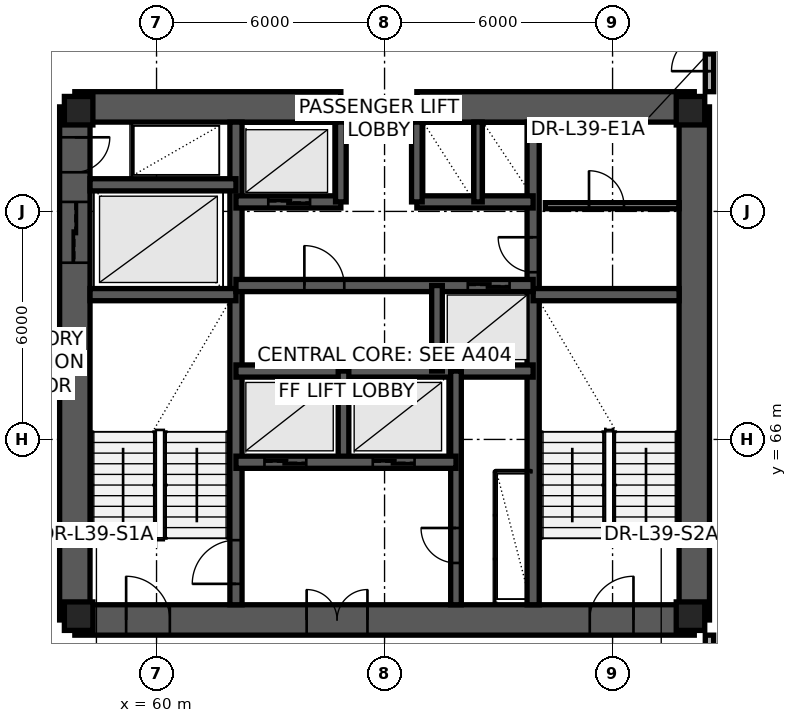
"""IFC4 building model, lengths in metres.
Left out: names, types, materials, properties, quantities, classifications, styles, units other than length and angle.
Written with IfcOpenShell. Run it as: python <this file> out.ifc"""

import sys

from ifc_helpers import new_model, si_unit, direction, frame, frame_2d, origin, origin_2d, place, context, subcontext, project, spatial, rectangle, extrude, element, fill, save


model = new_model("IFC4")
c1 = context("Model", 3, precision=1e-05, world=origin(), true_north=direction((0.0, 1.0)))
c2 = subcontext(c1, "Body", "Model", "MODEL_VIEW")
j1 = project(units=[si_unit("LENGTHUNIT", "METRE"), si_unit("PLANEANGLEUNIT", "RADIAN")], contexts=[c1])
p1 = place(None, origin())
s1 = spatial("IfcSite", under=j1, at=p1, CompositionType="ELEMENT")
p2 = place(p1, origin())
s2 = spatial("IfcBuilding", under=s1, at=p2, CompositionType="ELEMENT")
p3 = place(p2, frame((0.0, 0.0, 149.1)))
s3 = spatial("IfcBuildingStorey", under=s2, at=p3, CompositionType="ELEMENT", Elevation=149.1)
p4 = place(p3, frame((57.85, 61.25, 0.0), z_axis=(0.0, 0.0, 1.0), x_axis=(1.0, 0.0, 0.0)))
e1 = element("IfcWall", 1, at=p4, inside=s3, PredefinedType="SHEAR", context=c2, shape_type="SweptSolid", body=[
    extrude(rectangle(XDim=16.3, YDim=0.8, at=frame_2d((8.15, 0.0))), origin(), (0.0, 0.0, 1.0), 3.65),
])
p5 = place(p4, frame((1.35, 0.0, 0.0)))
e2 = element("IfcOpeningElement", 2, at=p5, cuts=e1, PredefinedType="OPENING", context=c2, shape_type="SweptSolid", body=[
    extrude(rectangle(XDim=1.15, YDim=2.15, at=frame_2d((0.575, 1.075))), frame((0.0, 0.41, 0.0), z_axis=(0.0, -1.0, 0.0), x_axis=(1.0, 0.0, 0.0)), (0.0, 0.0, 1.0), 0.82),
])
p6 = place(p4, frame((6.1, 0.0, 0.0)))
e3 = element("IfcOpeningElement", 3, at=p6, cuts=e1, PredefinedType="OPENING", context=c2, shape_type="SweptSolid", body=[
    extrude(rectangle(XDim=1.6, YDim=2.15, at=frame_2d((0.8, 1.075))), frame((0.0, 0.41, 0.0), z_axis=(0.0, -1.0, 0.0), x_axis=(1.0, 0.0, 0.0)), (0.0, 0.0, 1.0), 0.82),
])
p7 = place(p4, frame((13.55, 0.0, 0.0)))
e4 = element("IfcOpeningElement", 4, at=p7, cuts=e1, PredefinedType="OPENING", context=c2, shape_type="SweptSolid", body=[
    extrude(rectangle(XDim=1.15, YDim=2.15, at=frame_2d((0.575, 1.075))), frame((0.0, 0.41, 0.0), z_axis=(0.0, -1.0, 0.0), x_axis=(1.0, 0.0, 0.0)), (0.0, 0.0, 1.0), 0.82),
])
p8 = place(p3, frame((74.15, 61.25, 0.0), z_axis=(0.0, 0.0, 1.0), x_axis=(0.0, 1.0, 0.0)))
e5 = element("IfcWall", 5, at=p8, inside=s3, PredefinedType="SHEAR", context=c2, shape_type="SweptSolid", body=[
    extrude(rectangle(XDim=13.5, YDim=0.8, at=frame_2d((6.75, 0.0))), origin(), (0.0, 0.0, 1.0), 3.65),
])
p9 = place(p3, frame((74.15, 74.75, 0.0), z_axis=(0.0, 0.0, 1.0), x_axis=(-1.0, 0.0, 0.0)))
e6 = element("IfcWall", 6, at=p9, inside=s3, PredefinedType="SHEAR", context=c2, shape_type="SweptSolid", body=[
    extrude(rectangle(XDim=7.3, YDim=0.8, at=frame_2d((3.65, 0.0))), origin(), (0.0, 0.0, 1.0), 3.65),
])
p10 = place(p3, frame((64.85, 74.75, 0.0), z_axis=(0.0, 0.0, 1.0), x_axis=(-1.0, 0.0, 0.0)))
e7 = element("IfcWall", 7, at=p10, inside=s3, PredefinedType="SHEAR", context=c2, shape_type="SweptSolid", body=[
    extrude(rectangle(XDim=7.0, YDim=0.8, at=frame_2d((3.5, 0.0))), origin(), (0.0, 0.0, 1.0), 3.65),
])
p11 = place(p3, frame((57.85, 74.75, 0.0), z_axis=(0.0, 0.0, 1.0), x_axis=(0.0, -1.0, 0.0)))
e8 = element("IfcWall", 8, at=p11, inside=s3, PredefinedType="SHEAR", context=c2, shape_type="SweptSolid", body=[
    extrude(rectangle(XDim=13.5, YDim=0.8, at=frame_2d((6.75, 0.0))), origin(), (0.0, 0.0, 1.0), 3.65),
])
p12 = place(p11, frame((0.8, 0.0, 0.0)))
e9 = element("IfcOpeningElement", 9, at=p12, cuts=e8, PredefinedType="OPENING", context=c2, shape_type="SweptSolid", body=[
    extrude(rectangle(XDim=0.92, YDim=2.05, at=frame_2d((0.46, 1.025))), frame((0.0, 0.41, 0.0), z_axis=(0.0, -1.0, 0.0), x_axis=(1.0, 0.0, 0.0)), (0.0, 0.0, 1.0), 0.82),
])
p13 = place(p11, frame((2.5, 0.0, 0.0)))
e10 = element("IfcOpeningElement", 10, at=p13, cuts=e8, PredefinedType="OPENING", context=c2, shape_type="SweptSolid", body=[
    extrude(rectangle(XDim=1.6, YDim=2.3, at=frame_2d((0.8, 1.15))), frame((0.0, 0.41, 0.0), z_axis=(0.0, -1.0, 0.0), x_axis=(1.0, 0.0, 0.0)), (0.0, 0.0, 1.0), 0.82),
])
p14 = place(p3, frame((62.09, 61.65, 0.0), z_axis=(0.0, 0.0, 1.0), x_axis=(0.0, 1.0, 0.0)))
e11 = element("IfcWall", 11, at=p14, inside=s3, PredefinedType="SHEAR", context=c2, shape_type="SweptSolid", body=[
    extrude(rectangle(XDim=12.7, YDim=0.32, at=frame_2d((6.35, 0.0))), origin(), (0.0, 0.0, 1.0), 3.65),
])
p15 = place(p14, frame((0.55, 0.0, 0.0)))
e12 = element("IfcOpeningElement", 12, at=p15, cuts=e11, PredefinedType="OPENING", context=c2, shape_type="SweptSolid", body=[
    extrude(rectangle(XDim=1.15, YDim=2.15, at=frame_2d((0.575, 1.075))), frame((0.0, 0.17, 0.0), z_axis=(0.0, -1.0, 0.0), x_axis=(1.0, 0.0, 0.0)), (0.0, 0.0, 1.0), 0.34),
])
p16 = place(p3, frame((69.91, 61.65, 0.0), z_axis=(0.0, 0.0, 1.0), x_axis=(0.0, 1.0, 0.0)))
e13 = element("IfcWall", 13, at=p16, inside=s3, PredefinedType="SHEAR", context=c2, shape_type="SweptSolid", body=[
    extrude(rectangle(XDim=12.7, YDim=0.32, at=frame_2d((6.35, 0.0))), origin(), (0.0, 0.0, 1.0), 3.65),
])
p17 = place(p16, frame((8.75, 0.0, 0.0)))
e14 = element("IfcOpeningElement", 14, at=p17, cuts=e13, PredefinedType="OPENING", context=c2, shape_type="SweptSolid", body=[
    extrude(rectangle(XDim=0.92, YDim=2.05, at=frame_2d((0.46, 1.025))), frame((0.0, 0.17, 0.0), z_axis=(0.0, -1.0, 0.0), x_axis=(1.0, 0.0, 0.0)), (0.0, 0.0, 1.0), 0.34),
])
for number, where, z_axis, x_axis in (
    (15, (58.25, 69.81, 0.0), (0.0, 0.0, 1.0), (1.0, 0.0, 0.0)),
    (16, (69.91, 69.81, 0.0), (0.0, 0.0, 1.0), (1.0, 0.0, 0.0)),
    (17, (58.25, 72.7, 0.0), (0.0, 0.0, 1.0), (1.0, 0.0, 0.0)),
):
    element("IfcWall", number, at=place(p3, frame(where, z_axis=z_axis, x_axis=x_axis)), inside=s3, PredefinedType="SHEAR", context=c2, shape_type="SweptSolid", body=[
        extrude(rectangle(XDim=3.84, YDim=0.32, at=frame_2d((1.92, 0.0))), origin(), (0.0, 0.0, 1.0), 3.65),
    ])
p18 = place(p3, frame((62.09, 67.8, 0.0), z_axis=(0.0, 0.0, 1.0), x_axis=(1.0, 0.0, 0.0)))
e18 = element("IfcWall", 18, at=p18, inside=s3, PredefinedType="SHEAR", context=c2, shape_type="SweptSolid", body=[
    extrude(rectangle(XDim=7.82, YDim=0.32, at=frame_2d((3.91, 0.0))), origin(), (0.0, 0.0, 1.0), 3.65),
])
p19 = place(p3, frame((64.92, 65.4, 0.0), z_axis=(0.0, 0.0, 1.0), x_axis=(0.0, 1.0, 0.0)))
e19 = element("IfcWall", 19, at=p19, inside=s3, PredefinedType="SHEAR", context=c2, shape_type="SweptSolid", body=[
    extrude(rectangle(XDim=2.4, YDim=0.28, at=frame_2d((1.2, 0.0))), origin(), (0.0, 0.0, 1.0), 3.65),
])
p20 = place(p3, frame((62.09, 70.05, 0.0), z_axis=(0.0, 0.0, 1.0), x_axis=(1.0, 0.0, 0.0)))
e20 = element("IfcWall", 20, at=p20, inside=s3, PredefinedType="SHEAR", context=c2, shape_type="SweptSolid", body=[
    extrude(rectangle(XDim=7.82, YDim=0.32, at=frame_2d((3.91, 0.0))), origin(), (0.0, 0.0, 1.0), 3.65),
])
p21 = place(p20, frame((1.8, 0.0, 0.0)))
e21 = element("IfcOpeningElement", 21, at=p21, cuts=e20, PredefinedType="OPENING", context=c2, shape_type="SweptSolid", body=[
    extrude(rectangle(XDim=1.05, YDim=2.15, at=frame_2d((0.525, 1.075))), frame((0.0, 0.17, 0.0), z_axis=(0.0, -1.0, 0.0), x_axis=(1.0, 0.0, 0.0)), (0.0, 0.0, 1.0), 0.34),
])
p22 = place(p20, frame((6.1, 0.0, 0.0)))
e22 = element("IfcOpeningElement", 22, at=p22, cuts=e20, PredefinedType="OPENING", context=c2, shape_type="SweptSolid", body=[
    extrude(rectangle(XDim=1.1, YDim=2.2, at=frame_2d((0.55, 1.1))), frame((0.0, 0.17, 0.0), z_axis=(0.0, -1.0, 0.0), x_axis=(1.0, 0.0, 0.0)), (0.0, 0.0, 1.0), 0.34),
])
p23 = place(p3, frame((62.09, 72.25, 0.0), z_axis=(0.0, 0.0, 1.0), x_axis=(1.0, 0.0, 0.0)))
e23 = element("IfcWall", 23, at=p23, inside=s3, PredefinedType="SHEAR", context=c2, shape_type="SweptSolid", body=[
    extrude(rectangle(XDim=2.76, YDim=0.32, at=frame_2d((1.38, 0.0))), origin(), (0.0, 0.0, 1.0), 3.65),
])
p24 = place(p23, frame((0.85, 0.0, 0.0)))
e24 = element("IfcOpeningElement", 24, at=p24, cuts=e23, PredefinedType="OPENING", context=c2, shape_type="SweptSolid", body=[
    extrude(rectangle(XDim=1.1, YDim=2.2, at=frame_2d((0.55, 1.1))), frame((0.0, 0.17, 0.0), z_axis=(0.0, -1.0, 0.0), x_axis=(1.0, 0.0, 0.0)), (0.0, 0.0, 1.0), 0.34),
])
p25 = place(p3, frame((66.85, 72.25, 0.0), z_axis=(0.0, 0.0, 1.0), x_axis=(1.0, 0.0, 0.0)))
e25 = element("IfcWall", 25, at=p25, inside=s3, PredefinedType="SHEAR", context=c2, shape_type="SweptSolid", body=[
    extrude(rectangle(XDim=3.06, YDim=0.32, at=frame_2d((1.53, 0.0))), origin(), (0.0, 0.0, 1.0), 3.65),
])
for number, where, z_axis, x_axis in (
    (26, (64.85, 72.25, 0.0), (0.0, 0.0, 1.0), (0.0, 1.0, 0.0)),
    (27, (66.85, 72.25, 0.0), (0.0, 0.0, 1.0), (0.0, 1.0, 0.0)),
):
    element("IfcWall", number, at=place(p3, frame(where, z_axis=z_axis, x_axis=x_axis)), inside=s3, PredefinedType="SHEAR", context=c2, shape_type="SweptSolid", body=[
        extrude(rectangle(XDim=2.1, YDim=0.28, at=frame_2d((1.05, 0.0))), origin(), (0.0, 0.0, 1.0), 3.65),
    ])
p26 = place(p3, frame((68.46, 72.25, 0.0), z_axis=(0.0, 0.0, 1.0), x_axis=(0.0, 1.0, 0.0)))
e28 = element("IfcWall", 28, at=p26, inside=s3, PredefinedType="SHEAR", context=c2, shape_type="SweptSolid", body=[
    extrude(rectangle(XDim=2.1, YDim=0.22, at=frame_2d((1.05, 0.0))), origin(), (0.0, 0.0, 1.0), 3.65),
])
p27 = place(p3, frame((67.88, 61.65, 0.0), z_axis=(0.0, 0.0, 1.0), x_axis=(0.0, 1.0, 0.0)))
e29 = element("IfcWall", 29, at=p27, inside=s3, PredefinedType="SHEAR", context=c2, shape_type="SweptSolid", body=[
    extrude(rectangle(XDim=6.15, YDim=0.28, at=frame_2d((3.075, 0.0))), origin(), (0.0, 0.0, 1.0), 3.65),
])
p28 = place(p27, frame((1.1, 0.0, 0.0)))
e30 = element("IfcOpeningElement", 30, at=p28, cuts=e29, PredefinedType="OPENING", context=c2, shape_type="SweptSolid", body=[
    extrude(rectangle(XDim=0.92, YDim=2.05, at=frame_2d((0.46, 1.025))), frame((0.0, 0.15, 0.0), z_axis=(0.0, -1.0, 0.0), x_axis=(1.0, 0.0, 0.0)), (0.0, 0.0, 1.0), 0.3),
])
p29 = place(p3, frame((62.09, 65.4, 0.0), z_axis=(0.0, 0.0, 1.0), x_axis=(1.0, 0.0, 0.0)))
e31 = element("IfcWall", 31, at=p29, inside=s3, PredefinedType="SHEAR", context=c2, shape_type="SweptSolid", body=[
    extrude(rectangle(XDim=5.79, YDim=0.32, at=frame_2d((2.895, 0.0))), origin(), (0.0, 0.0, 1.0), 3.65),
])
p30 = place(p29, frame((0.75, 0.0, 0.0)))
e32 = element("IfcOpeningElement", 32, at=p30, cuts=e31, PredefinedType="OPENING", context=c2, shape_type="SweptSolid", body=[
    extrude(rectangle(XDim=1.1, YDim=2.2, at=frame_2d((0.55, 1.1))), frame((0.0, 0.17, 0.0), z_axis=(0.0, -1.0, 0.0), x_axis=(1.0, 0.0, 0.0)), (0.0, 0.0, 1.0), 0.34),
])
p31 = place(p29, frame((3.6, 0.0, 0.0)))
e33 = element("IfcOpeningElement", 33, at=p31, cuts=e31, PredefinedType="OPENING", context=c2, shape_type="SweptSolid", body=[
    extrude(rectangle(XDim=1.1, YDim=2.2, at=frame_2d((0.55, 1.1))), frame((0.0, 0.17, 0.0), z_axis=(0.0, -1.0, 0.0), x_axis=(1.0, 0.0, 0.0)), (0.0, 0.0, 1.0), 0.34),
])
p32 = place(p3, frame((67.38, 67.8, 0.0), z_axis=(0.0, 0.0, 1.0), x_axis=(0.0, 1.0, 0.0)))
e34 = element("IfcWall", 34, at=p32, inside=s3, PredefinedType="SHEAR", context=c2, shape_type="SweptSolid", body=[
    extrude(rectangle(XDim=2.25, YDim=0.28, at=frame_2d((1.125, 0.0))), origin(), (0.0, 0.0, 1.0), 3.65),
])
for number, where, z_axis, x_axis in (
    (35, (57.95, 61.35, 0.0), (0.0, 0.0, 1.0), (1.0, 0.0, 0.0)),
    (36, (74.05, 61.35, 0.0), (0.0, 0.0, 1.0), (1.0, 0.0, 0.0)),
    (37, (74.05, 74.65, 0.0), (0.0, 0.0, 1.0), (1.0, 0.0, 0.0)),
    (38, (57.95, 74.65, 0.0), (0.0, 0.0, 1.0), (1.0, 0.0, 0.0)),
):
    element("IfcColumn", number, at=place(p3, frame(where, z_axis=z_axis, x_axis=x_axis)), inside=s3, PredefinedType="COLUMN", context=c2, shape_type="SweptSolid", body=[
        extrude(rectangle(XDim=0.75, YDim=0.75, at=origin_2d()), origin(), (0.0, 0.0, 1.0), 3.65),
    ])
p33 = place(p3, frame((61.233, 27.594, 0.0), z_axis=(0.0, 0.0, 1.0), x_axis=(-0.399698312425, 0.916646747141, 0.0)))
e39 = element("IfcWall", 39, at=p33, inside=s3, PredefinedType="STANDARD", context=c2, shape_type="SweptSolid", body=[
    extrude(rectangle(XDim=58.525, YDim=0.34, at=frame_2d((29.262, 0.0))), origin(), (0.0, 0.0, 1.0), 0.85),
])
p34 = place(p3, frame((70.23, 72.15, 0.0), z_axis=(0.0, 0.0, 1.0), x_axis=(1.0, 0.0, 0.0)))
e40 = element("IfcWall", 40, at=p34, inside=s3, PredefinedType="PARTITIONING", context=c2, shape_type="SweptSolid", body=[
    extrude(rectangle(XDim=3.52, YDim=0.16, at=frame_2d((1.76, 0.0))), origin(), (0.0, 0.0, 1.0), 3.375),
])
p35 = place(p34, frame((1.15, 0.0, 0.0)))
e41 = element("IfcOpeningElement", 41, at=p35, cuts=e40, PredefinedType="OPENING", context=c2, shape_type="SweptSolid", body=[
    extrude(rectangle(XDim=0.92, YDim=2.05, at=frame_2d((0.46, 1.025))), frame((0.0, 0.09, 0.0), z_axis=(0.0, -1.0, 0.0), x_axis=(1.0, 0.0, 0.0)), (0.0, 0.0, 1.0), 0.18),
])
p36 = place(p3, frame((74.55, 75.15, 0.0), z_axis=(0.0, 0.0, 1.0), x_axis=(0.0, 1.0, 0.0)))
e42 = element("IfcWall", 42, at=p36, inside=s3, PredefinedType="PARTITIONING", context=c2, shape_type="SweptSolid", body=[
    extrude(rectangle(XDim=2.08, YDim=0.22, at=frame_2d((1.04, 0.0))), origin(), (0.0, 0.0, 1.0), 3.375),
])
p37 = place(p36, frame((0.54, 0.0, 0.0)))
e43 = element("IfcOpeningElement", 43, at=p37, cuts=e42, PredefinedType="OPENING", context=c2, shape_type="SweptSolid", body=[
    extrude(rectangle(XDim=1.0, YDim=2.1, at=frame_2d((0.5, 1.05))), frame((0.0, 0.12, 0.0), z_axis=(0.0, -1.0, 0.0), x_axis=(1.0, 0.0, 0.0)), (0.0, 0.0, 1.0), 0.24),
])
p38 = place(p3, frame((74.55, 59.43, 0.0), z_axis=(0.0, 0.0, 1.0), x_axis=(0.0, 1.0, 0.0)))
e44 = element("IfcWall", 44, at=p38, inside=s3, PredefinedType="PARTITIONING", context=c2, shape_type="SweptSolid", body=[
    extrude(rectangle(XDim=1.42, YDim=0.22, at=frame_2d((0.71, 0.0))), origin(), (0.0, 0.0, 1.0), 2.705),
])
p39 = place(p15, origin())
e45 = element("IfcDoor", 45, at=p39, inside=s3, OperationType="SINGLE_SWING_LEFT", PredefinedType="DOOR", context=c2, shape_type="SweptSolid", body=[
    extrude(rectangle(XDim=1.15, YDim=2.15, at=frame_2d((0.575, 1.075))), frame((0.0, 0.025, 0.0), z_axis=(0.0, -1.0, 0.0), x_axis=(1.0, 0.0, 0.0)), (0.0, 0.0, 1.0), 0.05),
])
fill(e12, e45)
p40 = place(p28, origin())
e46 = element("IfcDoor", 46, at=p40, inside=s3, OperationType="SINGLE_SWING_RIGHT", PredefinedType="DOOR", context=c2, shape_type="SweptSolid", body=[
    extrude(rectangle(XDim=0.92, YDim=2.05, at=frame_2d((0.46, 1.025))), frame((0.0, 0.025, 0.0), z_axis=(0.0, -1.0, 0.0), x_axis=(1.0, 0.0, 0.0)), (0.0, 0.0, 1.0), 0.05),
])
fill(e30, e46)
p41 = place(p30, origin())
e47 = element("IfcDoor", 47, at=p41, inside=s3, OperationType="SLIDING_TO_LEFT", PredefinedType="DOOR", context=c2, shape_type="SweptSolid", body=[
    extrude(rectangle(XDim=1.1, YDim=2.2, at=frame_2d((0.55, 1.1))), frame((0.0, 0.025, 0.0), z_axis=(0.0, -1.0, 0.0), x_axis=(1.0, 0.0, 0.0)), (0.0, 0.0, 1.0), 0.05),
])
fill(e32, e47)
p42 = place(p31, origin())
e48 = element("IfcDoor", 48, at=p42, inside=s3, OperationType="SLIDING_TO_LEFT", PredefinedType="DOOR", context=c2, shape_type="SweptSolid", body=[
    extrude(rectangle(XDim=1.1, YDim=2.2, at=frame_2d((0.55, 1.1))), frame((0.0, 0.025, 0.0), z_axis=(0.0, -1.0, 0.0), x_axis=(1.0, 0.0, 0.0)), (0.0, 0.0, 1.0), 0.05),
])
fill(e33, e48)
p43 = place(p21, origin())
e49 = element("IfcDoor", 49, at=p43, inside=s3, OperationType="SINGLE_SWING_LEFT", PredefinedType="DOOR", context=c2, shape_type="SweptSolid", body=[
    extrude(rectangle(XDim=1.05, YDim=2.15, at=frame_2d((0.525, 1.075))), frame((0.0, 0.025, 0.0), z_axis=(0.0, -1.0, 0.0), x_axis=(1.0, 0.0, 0.0)), (0.0, 0.0, 1.0), 0.05),
])
fill(e21, e49)
p44 = place(p22, origin())
e50 = element("IfcDoor", 50, at=p44, inside=s3, OperationType="SLIDING_TO_LEFT", PredefinedType="DOOR", context=c2, shape_type="SweptSolid", body=[
    extrude(rectangle(XDim=1.1, YDim=2.2, at=frame_2d((0.55, 1.1))), frame((0.0, 0.025, 0.0), z_axis=(0.0, -1.0, 0.0), x_axis=(1.0, 0.0, 0.0)), (0.0, 0.0, 1.0), 0.05),
])
fill(e22, e50)
p45 = place(p24, origin())
e51 = element("IfcDoor", 51, at=p45, inside=s3, OperationType="SLIDING_TO_LEFT", PredefinedType="DOOR", context=c2, shape_type="SweptSolid", body=[
    extrude(rectangle(XDim=1.1, YDim=2.2, at=frame_2d((0.55, 1.1))), frame((0.0, 0.025, 0.0), z_axis=(0.0, -1.0, 0.0), x_axis=(1.0, 0.0, 0.0)), (0.0, 0.0, 1.0), 0.05),
])
fill(e24, e51)
p46 = place(p5, origin())
e52 = element("IfcDoor", 52, at=p46, inside=s3, OperationType="SINGLE_SWING_LEFT", PredefinedType="DOOR", context=c2, shape_type="SweptSolid", body=[
    extrude(rectangle(XDim=1.15, YDim=2.15, at=frame_2d((0.575, 1.075))), frame((0.0, 0.025, 0.0), z_axis=(0.0, -1.0, 0.0), x_axis=(1.0, 0.0, 0.0)), (0.0, 0.0, 1.0), 0.05),
])
fill(e2, e52)
p47 = place(p6, origin())
e53 = element("IfcDoor", 53, at=p47, inside=s3, OperationType="DOUBLE_DOOR_SINGLE_SWING", PredefinedType="DOOR", context=c2, shape_type="SweptSolid", body=[
    extrude(rectangle(XDim=1.6, YDim=2.15, at=frame_2d((0.8, 1.075))), frame((0.0, 0.025, 0.0), z_axis=(0.0, -1.0, 0.0), x_axis=(1.0, 0.0, 0.0)), (0.0, 0.0, 1.0), 0.05),
])
fill(e3, e53)
p48 = place(p7, origin())
e54 = element("IfcDoor", 54, at=p48, inside=s3, OperationType="SINGLE_SWING_RIGHT", PredefinedType="DOOR", context=c2, shape_type="SweptSolid", body=[
    extrude(rectangle(XDim=1.15, YDim=2.15, at=frame_2d((0.575, 1.075))), frame((0.0, 0.025, 0.0), z_axis=(0.0, -1.0, 0.0), x_axis=(1.0, 0.0, 0.0)), (0.0, 0.0, 1.0), 0.05),
])
fill(e4, e54)
p49 = place(p12, origin())
e55 = element("IfcDoor", 55, at=p49, inside=s3, OperationType="SINGLE_SWING_LEFT", PredefinedType="DOOR", context=c2, shape_type="SweptSolid", body=[
    extrude(rectangle(XDim=0.92, YDim=2.05, at=frame_2d((0.46, 1.025))), frame((0.0, 0.025, 0.0), z_axis=(0.0, -1.0, 0.0), x_axis=(1.0, 0.0, 0.0)), (0.0, 0.0, 1.0), 0.05),
])
fill(e9, e55)
p50 = place(p13, origin())
e56 = element("IfcDoor", 56, at=p50, inside=s3, OperationType="DOUBLE_DOOR_SLIDING", PredefinedType="DOOR", context=c2, shape_type="SweptSolid", body=[
    extrude(rectangle(XDim=1.6, YDim=2.3, at=frame_2d((0.8, 1.15))), frame((0.0, 0.025, 0.0), z_axis=(0.0, -1.0, 0.0), x_axis=(1.0, 0.0, 0.0)), (0.0, 0.0, 1.0), 0.05),
])
fill(e10, e56)
p51 = place(p17, origin())
e57 = element("IfcDoor", 57, at=p51, inside=s3, OperationType="SINGLE_SWING_RIGHT", PredefinedType="DOOR", context=c2, shape_type="SweptSolid", body=[
    extrude(rectangle(XDim=0.92, YDim=2.05, at=frame_2d((0.46, 1.025))), frame((0.0, 0.025, 0.0), z_axis=(0.0, -1.0, 0.0), x_axis=(1.0, 0.0, 0.0)), (0.0, 0.0, 1.0), 0.05),
])
fill(e14, e57)
p52 = place(p35, origin())
e58 = element("IfcDoor", 58, at=p52, inside=s3, OperationType="SINGLE_SWING_LEFT", PredefinedType="DOOR", context=c2, shape_type="SweptSolid", body=[
    extrude(rectangle(XDim=0.92, YDim=2.05, at=frame_2d((0.46, 1.025))), frame((0.0, 0.025, 0.0), z_axis=(0.0, -1.0, 0.0), x_axis=(1.0, 0.0, 0.0)), (0.0, 0.0, 1.0), 0.05),
])
fill(e41, e58)
p53 = place(p37, origin())
e59 = element("IfcDoor", 59, at=p53, inside=s3, OperationType="SINGLE_SWING_LEFT", PredefinedType="DOOR", context=c2, shape_type="SweptSolid", body=[
    extrude(rectangle(XDim=1.0, YDim=2.1, at=frame_2d((0.5, 1.05))), frame((0.0, 0.025, 0.0), z_axis=(0.0, -1.0, 0.0), x_axis=(1.0, 0.0, 0.0)), (0.0, 0.0, 1.0), 0.05),
])
fill(e43, e59)
save(model, sys.argv[1])
